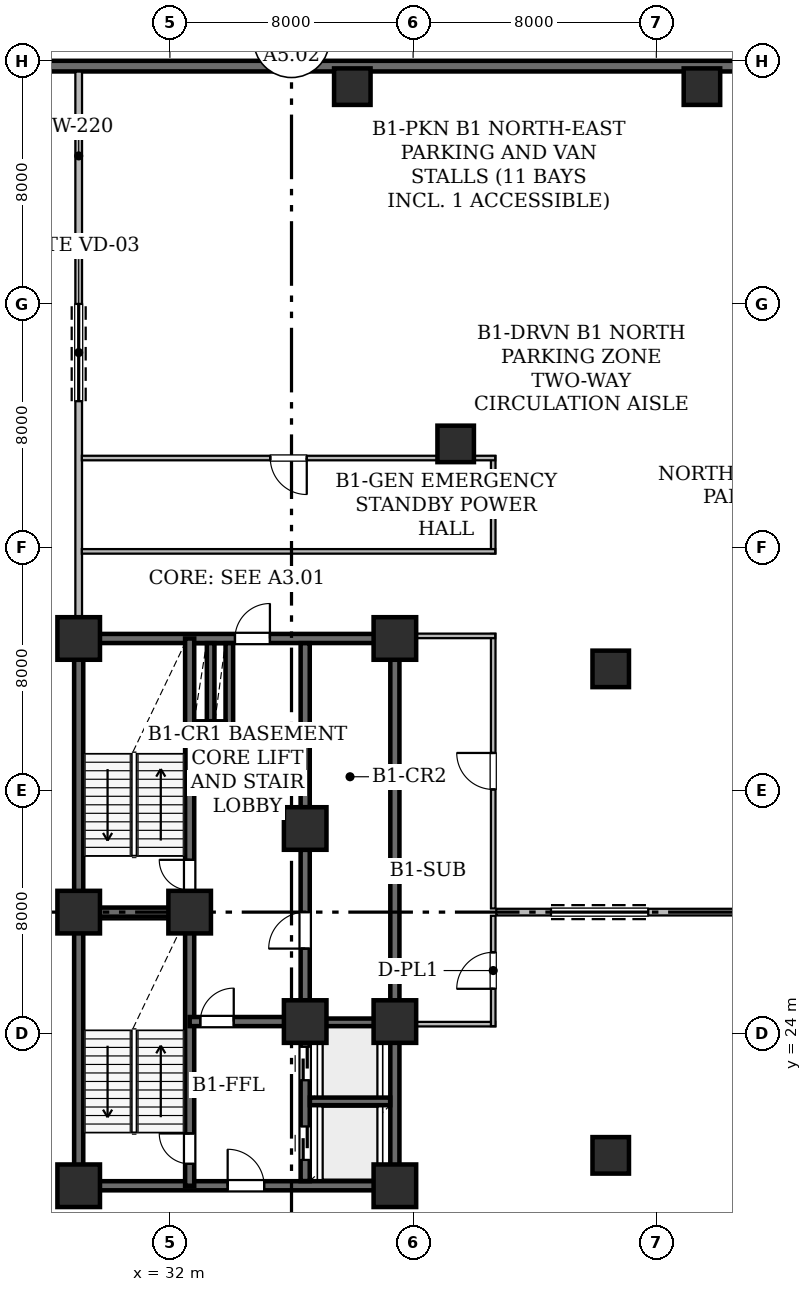
"""IFC4 building model, lengths in metres.
Left out: names, types, materials, properties, quantities, classifications, styles, units other than length and angle.
Written with IfcOpenShell. Run it as: python <this file> out.ifc"""

import sys

from ifc_helpers import new_model, si_unit, direction, frame, frame_2d, origin, origin_2d, place, context, subcontext, project, spatial, rectangle, hollow_rectangle, extrude, element, fill, save


model = new_model("IFC4")
c1 = context("Model", 3, precision=1e-05, world=origin(), true_north=direction((0.0, 1.0)))
c2 = subcontext(c1, "Body", "Model", "MODEL_VIEW")
j1 = project(units=[si_unit("LENGTHUNIT", "METRE"), si_unit("PLANEANGLEUNIT", "RADIAN")], contexts=[c1])
p1 = place(None, origin())
s1 = spatial("IfcSite", under=j1, at=p1, CompositionType="ELEMENT")
p2 = place(p1, origin())
s2 = spatial("IfcBuilding", under=s1, at=p2, CompositionType="ELEMENT")
p3 = place(p2, frame((0.0, 0.0, -4.5)))
s3 = spatial("IfcBuildingStorey", under=s2, at=p3, CompositionType="ELEMENT", Elevation=-4.5)
for number, where, z_axis, x_axis in (
    (1, (29.0, 19.0, 0.0), (0.0, 0.0, 1.0), (1.0, 0.0, 0.0)),
    (2, (32.65, 28.0, 0.0), (0.0, 0.0, 1.0), (1.0, 0.0, 0.0)),
    (3, (39.4, 19.0, 0.0), (0.0, 0.0, 1.0), (1.0, 0.0, 0.0)),
    (4, (29.0, 28.0, 0.0), (0.0, 0.0, 1.0), (1.0, 0.0, 0.0)),
    (5, (36.45, 24.4, 0.0), (0.0, 0.0, 1.0), (1.0, 0.0, 0.0)),
    (6, (39.4, 24.4, 0.0), (0.0, 0.0, 1.0), (1.0, 0.0, 0.0)),
    (7, (29.0, 37.0, 0.0), (0.0, 0.0, 1.0), (1.0, 0.0, 0.0)),
    (8, (36.45, 30.75, 0.0), (0.0, 0.0, 1.0), (1.0, 0.0, 0.0)),
    (9, (39.4, 37.0, 0.0), (0.0, 0.0, 1.0), (1.0, 0.0, 0.0)),
):
    element("IfcColumn", number, at=place(p3, frame(where, z_axis=z_axis, x_axis=x_axis)), inside=s3, PredefinedType="COLUMN", context=c2, shape_type="SweptSolid", body=[
        extrude(hollow_rectangle(XDim=1.4, YDim=1.4, WallThickness=0.07, at=origin_2d()), origin(), (0.0, 0.0, 1.0), 4.5),
    ])
for number, where, z_axis, x_axis in (
    (10, (38.0, 55.15, 0.0), (0.0, 0.0, 1.0), (1.0, 0.0, 0.0)),
    (11, (49.5, 55.15, 0.0), (0.0, 0.0, 1.0), (1.0, 0.0, 0.0)),
    (12, (41.4, 43.4, 0.0), (0.0, 0.0, 1.0), (1.0, 0.0, 0.0)),
    (13, (46.5, 20.0, 0.0), (0.0, 0.0, 1.0), (1.0, 0.0, 0.0)),
    (14, (46.5, 36.0, 0.0), (0.0, 0.0, 1.0), (1.0, 0.0, 0.0)),
):
    element("IfcColumn", number, at=place(p3, frame(where, z_axis=z_axis, x_axis=x_axis)), inside=s3, PredefinedType="COLUMN", context=c2, shape_type="SweptSolid", body=[
        extrude(hollow_rectangle(XDim=1.2, YDim=1.2, WallThickness=0.06, at=origin_2d()), origin(), (0.0, 0.0, 1.0), 4.5),
    ])
p4 = place(p3, frame((5.186, 55.825, 0.0), z_axis=(0.0, 0.0, 1.0), x_axis=(1.0, 0.0, 0.0)))
e15 = element("IfcWall", 15, at=p4, inside=s3, PredefinedType="USERDEFINED", context=c2, shape_type="SweptSolid", body=[
    extrude(rectangle(XDim=45.742, YDim=0.35, at=frame_2d((22.871, 0.0))), origin(), (0.0, 0.0, 1.0), 4.14),
])
p5 = place(p3, frame((29.0, 37.154, 0.0), z_axis=(0.0, 0.0, 1.0), x_axis=(0.0, 1.0, 0.0)))
e16 = element("IfcWall", 16, at=p5, inside=s3, PredefinedType="STANDARD", context=c2, shape_type="SweptSolid", body=[
    extrude(rectangle(XDim=18.492, YDim=0.22, at=frame_2d((9.246, 0.0))), origin(), (0.0, 0.0, 1.0), 4.14),
])
p6 = place(p5, frame((7.65, 0.0, 0.0)))
e17 = element("IfcOpeningElement", 17, at=p6, cuts=e16, PredefinedType="OPENING", context=c2, shape_type="SweptSolid", body=[
    extrude(rectangle(XDim=3.2, YDim=2.7, at=frame_2d((1.6, 1.35))), frame((0.0, 0.12, 0.0), z_axis=(0.0, -1.0, 0.0), x_axis=(1.0, 0.0, 0.0)), (0.0, 0.0, 1.0), 0.24),
])
p7 = place(p3, frame((42.735, 28.0, 0.0), z_axis=(0.0, 0.0, 1.0), x_axis=(1.0, 0.0, 0.0)))
e18 = element("IfcWall", 18, at=p7, inside=s3, PredefinedType="STANDARD", context=c2, shape_type="SweptSolid", body=[
    extrude(rectangle(XDim=11.048, YDim=0.22, at=frame_2d((5.524, 0.0))), origin(), (0.0, 0.0, 1.0), 4.14),
])
p8 = place(p7, frame((1.8, 0.0, 0.0)))
e19 = element("IfcOpeningElement", 19, at=p8, cuts=e18, PredefinedType="OPENING", context=c2, shape_type="SweptSolid", body=[
    extrude(rectangle(XDim=3.2, YDim=2.7, at=frame_2d((1.6, 1.35))), frame((0.0, 0.12, 0.0), z_axis=(0.0, -1.0, 0.0), x_axis=(1.0, 0.0, 0.0)), (0.0, 0.0, 1.0), 0.24),
])
for number, where, z_axis, x_axis in (
    (20, (29.0, 19.0, 0.0), (0.0, 0.0, 1.0), (0.0, 1.0, 0.0)),
    (21, (29.0, 28.0, 0.0), (0.0, 0.0, 1.0), (0.0, 1.0, 0.0)),
):
    element("IfcWall", number, at=place(p3, frame(where, z_axis=z_axis, x_axis=x_axis)), inside=s3, PredefinedType="SHEAR", context=c2, shape_type="SweptSolid", body=[
        extrude(rectangle(XDim=9.0, YDim=0.3, at=frame_2d((4.5, 0.0))), origin(), (0.0, 0.0, 1.0), 4.14),
    ])
p9 = place(p3, frame((29.0, 19.0, 0.0), z_axis=(0.0, 0.0, 1.0), x_axis=(1.0, 0.0, 0.0)))
e22 = element("IfcWall", 22, at=p9, inside=s3, PredefinedType="SHEAR", context=c2, shape_type="SweptSolid", body=[
    extrude(rectangle(XDim=10.4, YDim=0.3, at=frame_2d((5.2, 0.0))), origin(), (0.0, 0.0, 1.0), 4.14),
])
p10 = place(p9, frame((4.9, 0.0, 0.0)))
e23 = element("IfcOpeningElement", 23, at=p10, cuts=e22, PredefinedType="OPENING", context=c2, shape_type="SweptSolid", body=[
    extrude(rectangle(XDim=1.2, YDim=2.15, at=frame_2d((0.6, 1.075))), frame((0.0, 0.16, 0.0), z_axis=(0.0, -1.0, 0.0), x_axis=(1.0, 0.0, 0.0)), (0.0, 0.0, 1.0), 0.32),
])
p11 = place(p3, frame((29.0, 37.0, 0.0), z_axis=(0.0, 0.0, 1.0), x_axis=(1.0, 0.0, 0.0)))
e24 = element("IfcWall", 24, at=p11, inside=s3, PredefinedType="SHEAR", context=c2, shape_type="SweptSolid", body=[
    extrude(rectangle(XDim=10.4, YDim=0.3, at=frame_2d((5.2, 0.0))), origin(), (0.0, 0.0, 1.0), 4.14),
])
p12 = place(p11, frame((5.14, 0.0, 0.0)))
e25 = element("IfcOpeningElement", 25, at=p12, cuts=e24, PredefinedType="OPENING", context=c2, shape_type="SweptSolid", body=[
    extrude(rectangle(XDim=1.15, YDim=2.2, at=frame_2d((0.575, 1.1))), frame((0.0, 0.16, 0.0), z_axis=(0.0, -1.0, 0.0), x_axis=(1.0, 0.0, 0.0)), (0.0, 0.0, 1.0), 0.32),
])
p13 = place(p3, frame((39.4, 19.0, 0.0), z_axis=(0.0, 0.0, 1.0), x_axis=(0.0, 1.0, 0.0)))
e26 = element("IfcWall", 26, at=p13, inside=s3, PredefinedType="SHEAR", context=c2, shape_type="SweptSolid", body=[
    extrude(rectangle(XDim=5.4, YDim=0.3, at=frame_2d((2.7, 0.0))), origin(), (0.0, 0.0, 1.0), 4.14),
])
p14 = place(p3, frame((39.4, 24.4, 0.0), z_axis=(0.0, 0.0, 1.0), x_axis=(0.0, 1.0, 0.0)))
e27 = element("IfcWall", 27, at=p14, inside=s3, PredefinedType="SHEAR", context=c2, shape_type="SweptSolid", body=[
    extrude(rectangle(XDim=12.6, YDim=0.3, at=frame_2d((6.3, 0.0))), origin(), (0.0, 0.0, 1.0), 4.14),
])
p15 = place(p3, frame((32.65, 19.0, 0.0), z_axis=(0.0, 0.0, 1.0), x_axis=(0.0, 1.0, 0.0)))
e28 = element("IfcWall", 28, at=p15, inside=s3, PredefinedType="SHEAR", context=c2, shape_type="SweptSolid", body=[
    extrude(rectangle(XDim=9.0, YDim=0.3, at=frame_2d((4.5, 0.0))), origin(), (0.0, 0.0, 1.0), 4.14),
])
p16 = place(p15, frame((0.72, 0.0, 0.0)))
e29 = element("IfcOpeningElement", 29, at=p16, cuts=e28, PredefinedType="OPENING", context=c2, shape_type="SweptSolid", body=[
    extrude(rectangle(XDim=1.0, YDim=2.15, at=frame_2d((0.5, 1.075))), frame((0.0, 0.16, 0.0), z_axis=(0.0, -1.0, 0.0), x_axis=(1.0, 0.0, 0.0)), (0.0, 0.0, 1.0), 0.32),
])
p17 = place(p3, frame((32.65, 28.0, 0.0), z_axis=(0.0, 0.0, 1.0), x_axis=(0.0, 1.0, 0.0)))
e30 = element("IfcWall", 30, at=p17, inside=s3, PredefinedType="SHEAR", context=c2, shape_type="SweptSolid", body=[
    extrude(rectangle(XDim=9.0, YDim=0.3, at=frame_2d((4.5, 0.0))), origin(), (0.0, 0.0, 1.0), 4.14),
])
p18 = place(p17, frame((0.72, 0.0, 0.0)))
e31 = element("IfcOpeningElement", 31, at=p18, cuts=e30, PredefinedType="OPENING", context=c2, shape_type="SweptSolid", body=[
    extrude(rectangle(XDim=1.0, YDim=2.15, at=frame_2d((0.5, 1.075))), frame((0.0, 0.16, 0.0), z_axis=(0.0, -1.0, 0.0), x_axis=(1.0, 0.0, 0.0)), (0.0, 0.0, 1.0), 0.32),
])
p19 = place(p3, frame((29.0, 28.0, 0.0), z_axis=(0.0, 0.0, 1.0), x_axis=(1.0, 0.0, 0.0)))
e32 = element("IfcWall", 32, at=p19, inside=s3, PredefinedType="SHEAR", context=c2, shape_type="SweptSolid", body=[
    extrude(rectangle(XDim=3.65, YDim=0.3, at=frame_2d((1.825, 0.0))), origin(), (0.0, 0.0, 1.0), 4.14),
])
p20 = place(p3, frame((32.65, 24.4, 0.0), z_axis=(0.0, 0.0, 1.0), x_axis=(1.0, 0.0, 0.0)))
e33 = element("IfcWall", 33, at=p20, inside=s3, PredefinedType="SHEAR", context=c2, shape_type="SweptSolid", body=[
    extrude(rectangle(XDim=3.8, YDim=0.3, at=frame_2d((1.9, 0.0))), origin(), (0.0, 0.0, 1.0), 4.14),
])
p21 = place(p20, frame((0.35, 0.0, 0.0)))
e34 = element("IfcOpeningElement", 34, at=p21, cuts=e33, PredefinedType="OPENING", context=c2, shape_type="SweptSolid", body=[
    extrude(rectangle(XDim=1.1, YDim=2.15, at=frame_2d((0.55, 1.075))), frame((0.0, 0.16, 0.0), z_axis=(0.0, -1.0, 0.0), x_axis=(1.0, 0.0, 0.0)), (0.0, 0.0, 1.0), 0.32),
])
p22 = place(p3, frame((36.45, 19.154, 0.0), z_axis=(0.0, 0.0, 1.0), x_axis=(0.0, 1.0, 0.0)))
e35 = element("IfcWall", 35, at=p22, inside=s3, PredefinedType="SHEAR", context=c2, shape_type="SweptSolid", body=[
    extrude(rectangle(XDim=4.546, YDim=0.3, at=frame_2d((2.273, 0.0))), origin(), (0.0, 0.0, 1.0), 4.14),
])
p23 = place(p22, frame((0.696, 0.0, 0.0)))
e36 = element("IfcOpeningElement", 36, at=p23, cuts=e35, PredefinedType="OPENING", context=c2, shape_type="SweptSolid", body=[
    extrude(rectangle(XDim=1.1, YDim=2.15, at=frame_2d((0.55, 1.075))), frame((0.0, 0.16, 0.0), z_axis=(0.0, -1.0, 0.0), x_axis=(1.0, 0.0, 0.0)), (0.0, 0.0, 1.0), 0.32),
])
p24 = place(p22, frame((3.316, 0.0, 0.0)))
e37 = element("IfcOpeningElement", 37, at=p24, cuts=e35, PredefinedType="OPENING", context=c2, shape_type="SweptSolid", body=[
    extrude(rectangle(XDim=1.1, YDim=2.15, at=frame_2d((0.55, 1.075))), frame((0.0, 0.16, 0.0), z_axis=(0.0, -1.0, 0.0), x_axis=(1.0, 0.0, 0.0)), (0.0, 0.0, 1.0), 0.32),
])
p25 = place(p3, frame((36.45, 25.1, 0.0), z_axis=(0.0, 0.0, 1.0), x_axis=(0.0, 1.0, 0.0)))
e38 = element("IfcWall", 38, at=p25, inside=s3, PredefinedType="SHEAR", context=c2, shape_type="SweptSolid", body=[
    extrude(rectangle(XDim=4.95, YDim=0.3, at=frame_2d((2.475, 0.0))), origin(), (0.0, 0.0, 1.0), 4.14),
])
p26 = place(p25, frame((1.7, 0.0, 0.0)))
e39 = element("IfcOpeningElement", 39, at=p26, cuts=e38, PredefinedType="OPENING", context=c2, shape_type="SweptSolid", body=[
    extrude(rectangle(XDim=1.2, YDim=2.15, at=frame_2d((0.6, 1.075))), frame((0.0, 0.16, 0.0), z_axis=(0.0, -1.0, 0.0), x_axis=(1.0, 0.0, 0.0)), (0.0, 0.0, 1.0), 0.32),
])
p27 = place(p3, frame((36.45, 31.45, 0.0), z_axis=(0.0, 0.0, 1.0), x_axis=(0.0, 1.0, 0.0)))
e40 = element("IfcWall", 40, at=p27, inside=s3, PredefinedType="SHEAR", context=c2, shape_type="SweptSolid", body=[
    extrude(rectangle(XDim=5.396, YDim=0.3, at=frame_2d((2.698, 0.0))), origin(), (0.0, 0.0, 1.0), 4.14),
])
for number, where, z_axis, x_axis in (
    (41, (36.604, 21.775, 0.0), (0.0, 0.0, 1.0), (1.0, 0.0, 0.0)),
    (42, (36.604, 24.375, 0.0), (0.0, 0.0, 1.0), (1.0, 0.0, 0.0)),
):
    element("IfcWall", number, at=place(p3, frame(where, z_axis=z_axis, x_axis=x_axis)), inside=s3, PredefinedType="SHEAR", context=c2, shape_type="SweptSolid", body=[
        extrude(rectangle(XDim=2.642, YDim=0.25, at=frame_2d((1.321, 0.0))), origin(), (0.0, 0.0, 1.0), 4.14),
    ])
p28 = place(p3, frame((33.955, 34.025, 0.0), z_axis=(0.0, 0.0, 1.0), x_axis=(0.0, 1.0, 0.0)))
e43 = element("IfcWall", 43, at=p28, inside=s3, PredefinedType="SHEAR", context=c2, shape_type="SweptSolid", body=[
    extrude(rectangle(XDim=2.821, YDim=0.25, at=frame_2d((1.411, 0.0))), origin(), (0.0, 0.0, 1.0), 4.14),
])
p29 = place(p3, frame((32.804, 34.15, 0.0), z_axis=(0.0, 0.0, 1.0), x_axis=(1.0, 0.0, 0.0)))
e44 = element("IfcWall", 44, at=p29, inside=s3, PredefinedType="SHEAR", context=c2, shape_type="SweptSolid", body=[
    extrude(rectangle(XDim=1.022, YDim=0.25, at=frame_2d((0.511, 0.0))), origin(), (0.0, 0.0, 1.0), 4.14),
])
p30 = place(p3, frame((33.34, 34.279, 0.0), z_axis=(0.0, 0.0, 1.0), x_axis=(0.0, 1.0, 0.0)))
e45 = element("IfcWall", 45, at=p30, inside=s3, PredefinedType="SHEAR", context=c2, shape_type="SweptSolid", body=[
    extrude(rectangle(XDim=2.567, YDim=0.25, at=frame_2d((1.283, 0.0))), origin(), (0.0, 0.0, 1.0), 4.14),
])
p31 = place(p3, frame((39.542, 24.315, 0.0), z_axis=(0.0, 0.0, 1.0), x_axis=(1.0, 0.0, 0.0)))
e46 = element("IfcWall", 46, at=p31, inside=s3, PredefinedType="STANDARD", context=c2, shape_type="SweptSolid", body=[
    extrude(rectangle(XDim=3.158, YDim=0.15, at=frame_2d((1.579, 0.0))), origin(), (0.0, 0.0, 1.0), 3.275),
])
p32 = place(p3, frame((42.635, 24.25, 0.0), z_axis=(0.0, 0.0, 1.0), x_axis=(0.0, 1.0, 0.0)))
e47 = element("IfcWall", 47, at=p32, inside=s3, PredefinedType="STANDARD", context=c2, shape_type="SweptSolid", body=[
    extrude(rectangle(XDim=3.63, YDim=0.15, at=frame_2d((1.815, 0.0))), origin(), (0.0, 0.0, 1.0), 4.14),
])
p33 = place(p32, frame((1.228, 0.0, 0.0)))
e48 = element("IfcOpeningElement", 48, at=p33, cuts=e47, PredefinedType="OPENING", context=c2, shape_type="SweptSolid", body=[
    extrude(rectangle(XDim=1.2, YDim=2.15, at=frame_2d((0.6, 1.075))), frame((0.0, 0.085, 0.0), z_axis=(0.0, -1.0, 0.0), x_axis=(1.0, 0.0, 0.0)), (0.0, 0.0, 1.0), 0.17),
])
p34 = place(p3, frame((42.635, 28.12, 0.0), z_axis=(0.0, 0.0, 1.0), x_axis=(0.0, 1.0, 0.0)))
e49 = element("IfcWall", 49, at=p34, inside=s3, PredefinedType="STANDARD", context=c2, shape_type="SweptSolid", body=[
    extrude(rectangle(XDim=9.03, YDim=0.15, at=frame_2d((4.515, 0.0))), origin(), (0.0, 0.0, 1.0), 3.275),
])
p35 = place(p34, frame((3.915, 0.0, 0.0)))
e50 = element("IfcOpeningElement", 50, at=p35, cuts=e49, PredefinedType="OPENING", context=c2, shape_type="SweptSolid", body=[
    extrude(rectangle(XDim=1.2, YDim=2.15, at=frame_2d((0.6, 1.075))), frame((0.0, 0.085, 0.0), z_axis=(0.0, -1.0, 0.0), x_axis=(1.0, 0.0, 0.0)), (0.0, 0.0, 1.0), 0.17),
])
p36 = place(p3, frame((42.7, 37.085, 0.0), z_axis=(0.0, 0.0, 1.0), x_axis=(-1.0, 0.0, 0.0)))
e51 = element("IfcWall", 51, at=p36, inside=s3, PredefinedType="STANDARD", context=c2, shape_type="SweptSolid", body=[
    extrude(rectangle(XDim=3.243, YDim=0.15, at=frame_2d((1.622, 0.0))), origin(), (0.0, 0.0, 1.0), 3.275),
])
p37 = place(p3, frame((42.635, 39.8, 0.0), z_axis=(0.0, 0.0, 1.0), x_axis=(0.0, 1.0, 0.0)))
e52 = element("IfcWall", 52, at=p37, inside=s3, PredefinedType="STANDARD", context=c2, shape_type="SweptSolid", body=[
    extrude(rectangle(XDim=3.2, YDim=0.15, at=frame_2d((1.6, 0.0))), origin(), (0.0, 0.0, 1.0), 4.14),
])
p38 = place(p3, frame((42.7, 42.935, 0.0), z_axis=(0.0, 0.0, 1.0), x_axis=(-1.0, 0.0, 0.0)))
e53 = element("IfcWall", 53, at=p38, inside=s3, PredefinedType="STANDARD", context=c2, shape_type="SweptSolid", body=[
    extrude(rectangle(XDim=13.596, YDim=0.15, at=frame_2d((6.798, 0.0))), origin(), (0.0, 0.0, 1.0), 3.275),
])
p39 = place(p38, frame((6.198, 0.0, 0.0)))
e54 = element("IfcOpeningElement", 54, at=p39, cuts=e53, PredefinedType="OPENING", context=c2, shape_type="SweptSolid", body=[
    extrude(rectangle(XDim=1.2, YDim=2.15, at=frame_2d((0.6, 1.075))), frame((0.0, 0.085, 0.0), z_axis=(0.0, -1.0, 0.0), x_axis=(1.0, 0.0, 0.0)), (0.0, 0.0, 1.0), 0.17),
])
p40 = place(p3, frame((29.104, 39.865, 0.0), z_axis=(0.0, 0.0, 1.0), x_axis=(1.0, 0.0, 0.0)))
e55 = element("IfcWall", 55, at=p40, inside=s3, PredefinedType="STANDARD", context=c2, shape_type="SweptSolid", body=[
    extrude(rectangle(XDim=13.596, YDim=0.15, at=frame_2d((6.798, 0.0))), origin(), (0.0, 0.0, 1.0), 3.275),
])
p41 = place(p6, origin())
e56 = element("IfcDoor", 56, at=p41, inside=s3, OperationType="ROLLINGUP", PredefinedType="GATE", context=c2, shape_type="SweptSolid", body=[
    extrude(rectangle(XDim=3.2, YDim=2.7, at=frame_2d((1.6, 1.35))), frame((0.0, 0.025, 0.0), z_axis=(0.0, -1.0, 0.0), x_axis=(1.0, 0.0, 0.0)), (0.0, 0.0, 1.0), 0.05),
])
fill(e17, e56)
p42 = place(p8, origin())
e57 = element("IfcDoor", 57, at=p42, inside=s3, OperationType="ROLLINGUP", PredefinedType="GATE", context=c2, shape_type="SweptSolid", body=[
    extrude(rectangle(XDim=3.2, YDim=2.7, at=frame_2d((1.6, 1.35))), frame((0.0, 0.025, 0.0), z_axis=(0.0, -1.0, 0.0), x_axis=(1.0, 0.0, 0.0)), (0.0, 0.0, 1.0), 0.05),
])
fill(e19, e57)
p43 = place(p16, origin())
e58 = element("IfcDoor", 58, at=p43, inside=s3, OperationType="SINGLE_SWING_RIGHT", PredefinedType="DOOR", context=c2, shape_type="SweptSolid", body=[
    extrude(rectangle(XDim=1.0, YDim=2.15, at=frame_2d((0.5, 1.075))), frame((0.0, 0.025, 0.0), z_axis=(0.0, -1.0, 0.0), x_axis=(1.0, 0.0, 0.0)), (0.0, 0.0, 1.0), 0.05),
])
fill(e29, e58)
p44 = place(p18, origin())
e59 = element("IfcDoor", 59, at=p44, inside=s3, OperationType="SINGLE_SWING_RIGHT", PredefinedType="DOOR", context=c2, shape_type="SweptSolid", body=[
    extrude(rectangle(XDim=1.0, YDim=2.15, at=frame_2d((0.5, 1.075))), frame((0.0, 0.025, 0.0), z_axis=(0.0, -1.0, 0.0), x_axis=(1.0, 0.0, 0.0)), (0.0, 0.0, 1.0), 0.05),
])
fill(e31, e59)
p45 = place(p21, origin())
e60 = element("IfcDoor", 60, at=p45, inside=s3, OperationType="SINGLE_SWING_RIGHT", PredefinedType="DOOR", context=c2, shape_type="SweptSolid", body=[
    extrude(rectangle(XDim=1.1, YDim=2.15, at=frame_2d((0.55, 1.075))), frame((0.0, 0.025, 0.0), z_axis=(0.0, -1.0, 0.0), x_axis=(1.0, 0.0, 0.0)), (0.0, 0.0, 1.0), 0.05),
])
fill(e34, e60)
p46 = place(p10, origin())
e61 = element("IfcDoor", 61, at=p46, inside=s3, OperationType="SINGLE_SWING_LEFT", PredefinedType="DOOR", context=c2, shape_type="SweptSolid", body=[
    extrude(rectangle(XDim=1.2, YDim=2.15, at=frame_2d((0.6, 1.075))), frame((0.0, 0.025, 0.0), z_axis=(0.0, -1.0, 0.0), x_axis=(1.0, 0.0, 0.0)), (0.0, 0.0, 1.0), 0.05),
])
fill(e23, e61)
p47 = place(p12, origin())
e62 = element("IfcDoor", 62, at=p47, inside=s3, OperationType="SINGLE_SWING_RIGHT", PredefinedType="DOOR", context=c2, shape_type="SweptSolid", body=[
    extrude(rectangle(XDim=1.15, YDim=2.2, at=frame_2d((0.575, 1.1))), frame((0.0, 0.025, 0.0), z_axis=(0.0, -1.0, 0.0), x_axis=(1.0, 0.0, 0.0)), (0.0, 0.0, 1.0), 0.05),
])
fill(e25, e62)
p48 = place(p26, origin())
e63 = element("IfcDoor", 63, at=p48, inside=s3, OperationType="SINGLE_SWING_LEFT", PredefinedType="DOOR", context=c2, shape_type="SweptSolid", body=[
    extrude(rectangle(XDim=1.2, YDim=2.15, at=frame_2d((0.6, 1.075))), frame((0.0, 0.025, 0.0), z_axis=(0.0, -1.0, 0.0), x_axis=(1.0, 0.0, 0.0)), (0.0, 0.0, 1.0), 0.05),
])
fill(e39, e63)
p49 = place(p23, origin())
e64 = element("IfcDoor", 64, at=p49, inside=s3, OperationType="SLIDING_TO_LEFT", PredefinedType="DOOR", context=c2, shape_type="SweptSolid", body=[
    extrude(rectangle(XDim=1.1, YDim=2.15, at=frame_2d((0.55, 1.075))), frame((0.0, 0.025, 0.0), z_axis=(0.0, -1.0, 0.0), x_axis=(1.0, 0.0, 0.0)), (0.0, 0.0, 1.0), 0.05),
])
fill(e36, e64)
p50 = place(p24, origin())
e65 = element("IfcDoor", 65, at=p50, inside=s3, OperationType="SLIDING_TO_LEFT", PredefinedType="DOOR", context=c2, shape_type="SweptSolid", body=[
    extrude(rectangle(XDim=1.1, YDim=2.15, at=frame_2d((0.55, 1.075))), frame((0.0, 0.025, 0.0), z_axis=(0.0, -1.0, 0.0), x_axis=(1.0, 0.0, 0.0)), (0.0, 0.0, 1.0), 0.05),
])
fill(e37, e65)
p51 = place(p33, origin())
e66 = element("IfcDoor", 66, at=p51, inside=s3, OperationType="SINGLE_SWING_LEFT", PredefinedType="DOOR", context=c2, shape_type="SweptSolid", body=[
    extrude(rectangle(XDim=1.2, YDim=2.15, at=frame_2d((0.6, 1.075))), frame((0.0, 0.025, 0.0), z_axis=(0.0, -1.0, 0.0), x_axis=(1.0, 0.0, 0.0)), (0.0, 0.0, 1.0), 0.05),
])
fill(e48, e66)
p52 = place(p35, origin())
e67 = element("IfcDoor", 67, at=p52, inside=s3, OperationType="SINGLE_SWING_RIGHT", PredefinedType="DOOR", context=c2, shape_type="SweptSolid", body=[
    extrude(rectangle(XDim=1.2, YDim=2.15, at=frame_2d((0.6, 1.075))), frame((0.0, 0.025, 0.0), z_axis=(0.0, -1.0, 0.0), x_axis=(1.0, 0.0, 0.0)), (0.0, 0.0, 1.0), 0.05),
])
fill(e50, e67)
p53 = place(p39, origin())
e68 = element("IfcDoor", 68, at=p53, inside=s3, OperationType="SINGLE_SWING_LEFT", PredefinedType="DOOR", context=c2, shape_type="SweptSolid", body=[
    extrude(rectangle(XDim=1.2, YDim=2.15, at=frame_2d((0.6, 1.075))), frame((0.0, 0.025, 0.0), z_axis=(0.0, -1.0, 0.0), x_axis=(1.0, 0.0, 0.0)), (0.0, 0.0, 1.0), 0.05),
])
fill(e54, e68)
save(model, sys.argv[1])
